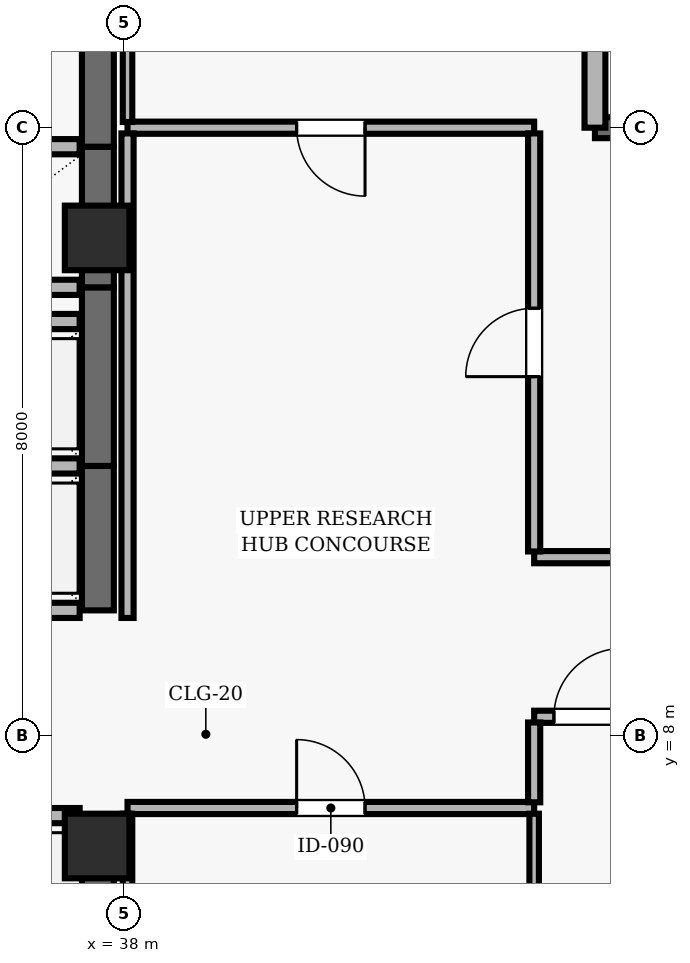
"""IFC4 building model, lengths in metres.
Left out: names, types, materials, properties, quantities, classifications, styles, units other than length and angle.
Written with IfcOpenShell. Run it as: python <this file> out.ifc"""

import sys

from ifc_helpers import new_model, si_unit, direction, frame, frame_2d, origin, origin_2d, place, context, subcontext, project, spatial, rectangle, extrude, element, fill, save


model = new_model("IFC4")
c1 = context("Model", 3, precision=1e-05, world=origin(), true_north=direction((0.0, 1.0)))
c2 = subcontext(c1, "Body", "Model", "MODEL_VIEW")
j1 = project(units=[si_unit("LENGTHUNIT", "METRE"), si_unit("PLANEANGLEUNIT", "RADIAN")], contexts=[c1])
p1 = place(None, origin())
s1 = spatial("IfcSite", under=j1, at=p1, CompositionType="ELEMENT")
p2 = place(p1, origin())
s2 = spatial("IfcBuilding", under=s1, at=p2, CompositionType="ELEMENT")
p3 = place(p2, frame((0.0, 0.0, 298.9)))
s3 = spatial("IfcBuildingStorey", under=s2, at=p3, CompositionType="ELEMENT", Elevation=298.9)
for number, where, z_axis, x_axis in (
    (1, (37.65, 6.55, 0.0), (0.0, 0.0, 1.0), (1.0, 0.0, 0.0)),
    (2, (37.65, 14.55, 0.0), (0.0, 0.0, 1.0), (1.0, 0.0, 0.0)),
):
    element("IfcColumn", number, at=place(p3, frame(where, z_axis=z_axis, x_axis=x_axis)), inside=s3, PredefinedType="COLUMN", context=c2, shape_type="SweptSolid", body=[
        extrude(rectangle(XDim=0.85, YDim=0.85, at=origin_2d()), origin(), (0.0, 0.0, 1.0), 3.9),
    ])
p4 = place(p3, frame((57.3, 16.0, 0.0), z_axis=(0.0, 0.0, 1.0), x_axis=(-1.0, 0.0, 0.0)))
e3 = element("IfcWall", 3, at=p4, inside=s3, PredefinedType="SOLIDWALL", context=c2, shape_type="SweptSolid", body=[
    extrude(rectangle(XDim=13.1, YDim=0.275, at=frame_2d((6.55, 0.0))), origin(), (0.0, 0.0, 1.0), 3.69),
])
p5 = place(p4, frame((7.05, 0.0, 0.0)))
e4 = element("IfcOpeningElement", 4, at=p5, cuts=e3, PredefinedType="OPENING", context=c2, shape_type="SweptSolid", body=[
    extrude(rectangle(XDim=1.0, YDim=2.2, at=frame_2d((0.5, 1.1))), frame((0.0, 0.147, 0.0), z_axis=(0.0, -1.0, 0.0), x_axis=(1.0, 0.0, 0.0)), (0.0, 0.0, 1.0), 0.295),
])
p6 = place(p4, frame((9.975, 0.0, 0.9)))
e5 = element("IfcOpeningElement", 5, at=p6, cuts=e3, PredefinedType="OPENING", context=c2, shape_type="SweptSolid", body=[
    extrude(rectangle(XDim=1.5, YDim=1.8, at=frame_2d((0.75, 0.9))), frame((0.0, 0.147, 0.0), z_axis=(0.0, -1.0, 0.0), x_axis=(1.0, 0.0, 0.0)), (0.0, 0.0, 1.0), 0.295),
])
p7 = place(p3, frame((44.2, 16.0, 0.0), z_axis=(0.0, 0.0, 1.0), x_axis=(0.0, 1.0, 0.0)))
e6 = element("IfcWall", 6, at=p7, inside=s3, PredefinedType="SOLIDWALL", context=c2, shape_type="SweptSolid", body=[
    extrude(rectangle(XDim=4.4, YDim=0.275, at=frame_2d((2.2, 0.0))), origin(), (0.0, 0.0, 1.0), 3.69),
])
p8 = place(p3, frame((37.66, 4.7, 0.0), z_axis=(0.0, 0.0, 1.0), x_axis=(0.0, 1.0, 0.0)))
e7 = element("IfcWall", 7, at=p8, inside=s3, PredefinedType="SHEAR", context=c2, shape_type="SweptSolid", body=[
    extrude(rectangle(XDim=2.25, YDim=0.42, at=frame_2d((1.125, 0.0))), origin(), (0.0, 0.0, 1.0), 3.69),
])
p9 = place(p3, frame((37.42, 6.95, 0.0), z_axis=(0.0, 0.0, 1.0), x_axis=(-1.0, 0.0, 0.0)))
e8 = element("IfcWall", 8, at=p9, inside=s3, PredefinedType="SOLIDWALL", context=c2, shape_type="SweptSolid", body=[
    extrude(rectangle(XDim=2.14, YDim=0.2, at=frame_2d((1.07, 0.0))), origin(), (0.0, 0.0, 1.0), 3.69),
])
p10 = place(p3, frame((37.66, 9.65, 0.0), z_axis=(0.0, 0.0, 1.0), x_axis=(0.0, 1.0, 0.0)))
e9 = element("IfcWall", 9, at=p10, inside=s3, PredefinedType="SHEAR", context=c2, shape_type="SweptSolid", body=[
    extrude(rectangle(XDim=1.9, YDim=0.42, at=frame_2d((0.95, 0.0))), origin(), (0.0, 0.0, 1.0), 3.69),
])
for number, where, z_axis, x_axis in (
    (10, (35.28, 9.65, 0.0), (0.0, 0.0, 1.0), (1.0, 0.0, 0.0)),
    (11, (37.42, 11.55, 0.0), (0.0, 0.0, 1.0), (-1.0, 0.0, 0.0)),
):
    element("IfcWall", number, at=place(p3, frame(where, z_axis=z_axis, x_axis=x_axis)), inside=s3, PredefinedType="SOLIDWALL", context=c2, shape_type="SweptSolid", body=[
        extrude(rectangle(XDim=2.14, YDim=0.2, at=frame_2d((1.07, 0.0))), origin(), (0.0, 0.0, 1.0), 3.69),
    ])
p11 = place(p3, frame((37.66, 11.55, 0.0), z_axis=(0.0, 0.0, 1.0), x_axis=(0.0, 1.0, 0.0)))
e12 = element("IfcWall", 12, at=p11, inside=s3, PredefinedType="SHEAR", context=c2, shape_type="SweptSolid", body=[
    extrude(rectangle(XDim=2.35, YDim=0.42, at=frame_2d((1.175, 0.0))), origin(), (0.0, 0.0, 1.0), 3.69),
])
p12 = place(p3, frame((37.42, 13.45, 0.0), z_axis=(0.0, 0.0, 1.0), x_axis=(-1.0, 0.0, 0.0)))
e13 = element("IfcWall", 13, at=p12, inside=s3, PredefinedType="SOLIDWALL", context=c2, shape_type="SweptSolid", body=[
    extrude(rectangle(XDim=2.14, YDim=0.2, at=frame_2d((1.07, 0.0))), origin(), (0.0, 0.0, 1.0), 3.69),
])
p13 = place(p3, frame((37.66, 13.9, 0.0), z_axis=(0.0, 0.0, 1.0), x_axis=(0.0, 1.0, 0.0)))
e14 = element("IfcWall", 14, at=p13, inside=s3, PredefinedType="SHEAR", context=c2, shape_type="SweptSolid", body=[
    extrude(rectangle(XDim=1.85, YDim=0.42, at=frame_2d((0.925, 0.0))), origin(), (0.0, 0.0, 1.0), 3.69),
])
for number, where, z_axis, x_axis in (
    (15, (35.28, 13.9, 0.0), (0.0, 0.0, 1.0), (1.0, 0.0, 0.0)),
    (16, (37.42, 15.75, 0.0), (0.0, 0.0, 1.0), (-1.0, 0.0, 0.0)),
):
    element("IfcWall", number, at=place(p3, frame(where, z_axis=z_axis, x_axis=x_axis)), inside=s3, PredefinedType="SOLIDWALL", context=c2, shape_type="SweptSolid", body=[
        extrude(rectangle(XDim=2.14, YDim=0.2, at=frame_2d((1.07, 0.0))), origin(), (0.0, 0.0, 1.0), 3.69),
    ])
p14 = place(p3, frame((37.66, 15.75, 0.0), z_axis=(0.0, 0.0, 1.0), x_axis=(0.0, 1.0, 0.0)))
e17 = element("IfcWall", 17, at=p14, inside=s3, PredefinedType="SHEAR", context=c2, shape_type="SweptSolid", body=[
    extrude(rectangle(XDim=1.85, YDim=0.42, at=frame_2d((0.925, 0.0))), origin(), (0.0, 0.0, 1.0), 3.69),
])
p15 = place(p3, frame((38.05, 7.05, 0.0), z_axis=(0.0, 0.0, 1.0), x_axis=(1.0, 0.0, 0.0)))
e18 = element("IfcWall", 18, at=p15, inside=s3, PredefinedType="PARTITIONING", context=c2, shape_type="SweptSolid", body=[
    extrude(rectangle(XDim=5.35, YDim=0.16, at=frame_2d((2.675, 0.0))), origin(), (0.0, 0.0, 1.0), 3.69),
])
p16 = place(p15, frame((2.225, 0.0, 0.0)))
e19 = element("IfcOpeningElement", 19, at=p16, cuts=e18, PredefinedType="OPENING", context=c2, shape_type="SweptSolid", body=[
    extrude(rectangle(XDim=0.9, YDim=2.1, at=frame_2d((0.45, 1.05))), frame((0.0, 0.09, 0.0), z_axis=(0.0, -1.0, 0.0), x_axis=(1.0, 0.0, 0.0)), (0.0, 0.0, 1.0), 0.18),
])
p17 = place(p3, frame((43.4, 8.25, 0.0), z_axis=(0.0, 0.0, 1.0), x_axis=(1.0, 0.0, 0.0)))
e20 = element("IfcWall", 20, at=p17, inside=s3, PredefinedType="PARTITIONING", context=c2, shape_type="SweptSolid", body=[
    extrude(rectangle(XDim=4.92, YDim=0.16, at=frame_2d((2.46, 0.0))), origin(), (0.0, 0.0, 1.0), 3.227),
])
p18 = place(p17, frame((0.26, 0.0, 0.0)))
e21 = element("IfcOpeningElement", 21, at=p18, cuts=e20, PredefinedType="OPENING", context=c2, shape_type="SweptSolid", body=[
    extrude(rectangle(XDim=0.9, YDim=2.1, at=frame_2d((0.45, 1.05))), frame((0.0, 0.09, 0.0), z_axis=(0.0, -1.0, 0.0), x_axis=(1.0, 0.0, 0.0)), (0.0, 0.0, 1.0), 0.18),
])
p19 = place(p3, frame((43.4, 16.0, 0.0), z_axis=(0.0, 0.0, 1.0), x_axis=(-1.0, 0.0, 0.0)))
e22 = element("IfcWall", 22, at=p19, inside=s3, PredefinedType="PARTITIONING", context=c2, shape_type="SweptSolid", body=[
    extrude(rectangle(XDim=5.35, YDim=0.16, at=frame_2d((2.675, 0.0))), origin(), (0.0, 0.0, 1.0), 3.39),
])
p20 = place(p19, frame((2.225, 0.0, 0.0)))
e23 = element("IfcOpeningElement", 23, at=p20, cuts=e22, PredefinedType="OPENING", context=c2, shape_type="SweptSolid", body=[
    extrude(rectangle(XDim=0.9, YDim=2.1, at=frame_2d((0.45, 1.05))), frame((0.0, 0.09, 0.0), z_axis=(0.0, -1.0, 0.0), x_axis=(1.0, 0.0, 0.0)), (0.0, 0.0, 1.0), 0.18),
])
p21 = place(p3, frame((48.32, 10.35, 0.0), z_axis=(0.0, 0.0, 1.0), x_axis=(-1.0, 0.0, 0.0)))
e24 = element("IfcWall", 24, at=p21, inside=s3, PredefinedType="PARTITIONING", context=c2, shape_type="SweptSolid", body=[
    extrude(rectangle(XDim=4.92, YDim=0.16, at=frame_2d((2.46, 0.0))), origin(), (0.0, 0.0, 1.0), 3.424),
])
p22 = place(p3, frame((38.05, 6.975, 0.0), z_axis=(0.0, 0.0, 1.0), x_axis=(0.0, -1.0, 0.0)))
e25 = element("IfcWall", 25, at=p22, inside=s3, PredefinedType="PARTITIONING", context=c2, shape_type="SweptSolid", body=[
    extrude(rectangle(XDim=6.842, YDim=0.125, at=frame_2d((3.421, 0.0))), origin(), (0.0, 0.0, 1.0), 3.227),
])
p23 = place(p3, frame((38.05, 15.925, 0.0), z_axis=(0.0, 0.0, 1.0), x_axis=(0.0, -1.0, 0.0)))
e26 = element("IfcWall", 26, at=p23, inside=s3, PredefinedType="PARTITIONING", context=c2, shape_type="SweptSolid", body=[
    extrude(rectangle(XDim=6.375, YDim=0.16, at=frame_2d((3.188, 0.0))), origin(), (0.0, 0.0, 1.0), 3.227),
])
p24 = place(p3, frame((38.05, 21.468, 0.0), z_axis=(0.0, 0.0, 1.0), x_axis=(0.0, -1.0, 0.0)))
e27 = element("IfcWall", 27, at=p24, inside=s3, PredefinedType="PARTITIONING", context=c2, shape_type="SweptSolid", body=[
    extrude(rectangle(XDim=5.393, YDim=0.125, at=frame_2d((2.697, 0.0))), origin(), (0.0, 0.0, 1.0), 3.227),
])
p25 = place(p3, frame((43.4, 0.133, 0.0), z_axis=(0.0, 0.0, 1.0), x_axis=(0.0, 1.0, 0.0)))
e28 = element("IfcWall", 28, at=p25, inside=s3, PredefinedType="PARTITIONING", context=c2, shape_type="SweptSolid", body=[
    extrude(rectangle(XDim=6.842, YDim=0.125, at=frame_2d((3.421, 0.0))), origin(), (0.0, 0.0, 1.0), 3.69),
])
p26 = place(p3, frame((43.4, 7.125, 0.0), z_axis=(0.0, 0.0, 1.0), x_axis=(0.0, 1.0, 0.0)))
e29 = element("IfcWall", 29, at=p26, inside=s3, PredefinedType="PARTITIONING", context=c2, shape_type="SweptSolid", body=[
    extrude(rectangle(XDim=1.05, YDim=0.16, at=frame_2d((0.525, 0.0))), origin(), (0.0, 0.0, 1.0), 3.69),
])
p27 = place(p3, frame((43.4, 10.425, 0.0), z_axis=(0.0, 0.0, 1.0), x_axis=(0.0, 1.0, 0.0)))
e30 = element("IfcWall", 30, at=p27, inside=s3, PredefinedType="PARTITIONING", context=c2, shape_type="SweptSolid", body=[
    extrude(rectangle(XDim=5.5, YDim=0.16, at=frame_2d((2.75, 0.0))), origin(), (0.0, 0.0, 1.0), 3.69),
])
p28 = place(p27, frame((2.3, 0.0, 0.0)))
e31 = element("IfcOpeningElement", 31, at=p28, cuts=e30, PredefinedType="OPENING", context=c2, shape_type="SweptSolid", body=[
    extrude(rectangle(XDim=0.9, YDim=2.1, at=frame_2d((0.45, 1.05))), frame((0.0, 0.09, 0.0), z_axis=(0.0, -1.0, 0.0), x_axis=(1.0, 0.0, 0.0)), (0.0, 0.0, 1.0), 0.18),
])
p29 = place(p16, origin())
e32 = element("IfcDoor", 32, at=p29, inside=s3, OperationType="SINGLE_SWING_LEFT", PredefinedType="DOOR", context=c2, shape_type="SweptSolid", body=[
    extrude(rectangle(XDim=0.9, YDim=2.1, at=frame_2d((0.45, 1.05))), frame((0.0, 0.025, 0.0), z_axis=(0.0, -1.0, 0.0), x_axis=(1.0, 0.0, 0.0)), (0.0, 0.0, 1.0), 0.05),
])
fill(e19, e32)
p30 = place(p18, origin())
e33 = element("IfcDoor", 33, at=p30, inside=s3, OperationType="SINGLE_SWING_RIGHT", PredefinedType="DOOR", context=c2, shape_type="SweptSolid", body=[
    extrude(rectangle(XDim=0.9, YDim=2.1, at=frame_2d((0.45, 1.05))), frame((0.0, 0.025, 0.0), z_axis=(0.0, -1.0, 0.0), x_axis=(1.0, 0.0, 0.0)), (0.0, 0.0, 1.0), 0.05),
])
fill(e21, e33)
p31 = place(p28, origin())
e34 = element("IfcDoor", 34, at=p31, inside=s3, OperationType="SINGLE_SWING_LEFT", PredefinedType="DOOR", context=c2, shape_type="SweptSolid", body=[
    extrude(rectangle(XDim=0.9, YDim=2.1, at=frame_2d((0.45, 1.05))), frame((0.0, 0.025, 0.0), z_axis=(0.0, -1.0, 0.0), x_axis=(1.0, 0.0, 0.0)), (0.0, 0.0, 1.0), 0.05),
])
fill(e31, e34)
p32 = place(p20, origin())
e35 = element("IfcDoor", 35, at=p32, inside=s3, OperationType="SINGLE_SWING_LEFT", PredefinedType="DOOR", context=c2, shape_type="SweptSolid", body=[
    extrude(rectangle(XDim=0.9, YDim=2.1, at=frame_2d((0.45, 1.05))), frame((0.0, 0.025, 0.0), z_axis=(0.0, -1.0, 0.0), x_axis=(1.0, 0.0, 0.0)), (0.0, 0.0, 1.0), 0.05),
])
fill(e23, e35)
save(model, sys.argv[1])
